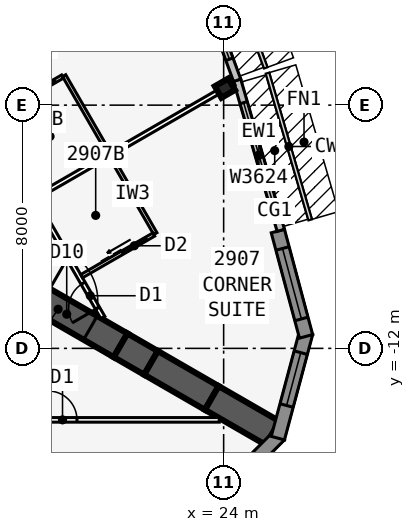
"""IFC4 building model, lengths in metres.
Left out: names, types, materials, properties, quantities, classifications, styles, units other than length and angle.
Written with IfcOpenShell. Run it as: python <this file> out.ifc"""

import sys

from ifc_helpers import new_model, si_unit, direction, frame, frame_2d, origin, origin_2d, place, context, subcontext, project, spatial, polyline, rectangle, i_section, outline, extrude, element, fill, save


model = new_model("IFC4")
c1 = context("Model", 3, precision=1e-05, world=origin(), true_north=direction((0.0, 1.0)))
c2 = subcontext(c1, "Body", "Model", "MODEL_VIEW")
j1 = project(units=[si_unit("LENGTHUNIT", "METRE"), si_unit("PLANEANGLEUNIT", "RADIAN")], contexts=[c1])
p1 = place(None, origin())
s1 = spatial("IfcSite", under=j1, at=p1, CompositionType="ELEMENT")
p2 = place(p1, origin())
s2 = spatial("IfcBuilding", under=s1, at=p2, CompositionType="ELEMENT")
p3 = place(p2, frame((0.0, 0.0, 114.7)))
s3 = spatial("IfcBuildingStorey", under=s2, at=p3, CompositionType="ELEMENT", Elevation=114.7)
p4 = place(p3, frame((16.5, -9.526, 0.0), z_axis=(0.0, 0.0, 1.0), x_axis=(0.866031398331, -0.499989616998, 0.0)))
e1 = element("IfcWall", 1, at=p4, inside=s3, PredefinedType="SHEAR", context=c2, shape_type="SweptSolid", body=[
    extrude(rectangle(XDim=4.746, YDim=0.9, at=frame_2d((2.373, 0.0))), origin(), (0.0, 0.0, 1.0), 3.4),
])
p5 = place(p4, frame((1.8, 0.0, 0.0)))
e2 = element("IfcOpeningElement", 2, at=p5, cuts=e1, PredefinedType="OPENING", context=c2, shape_type="SweptSolid", body=[
    extrude(rectangle(XDim=1.8, YDim=2.13, at=frame_2d((0.9, 1.065))), frame((0.0, 0.46, 0.0), z_axis=(0.0, -1.0, 0.0), x_axis=(1.0, 0.0, 0.0)), (0.0, 0.0, 1.0), 0.92),
])
p6 = place(p3, frame((20.61, -11.899, 0.0), z_axis=(0.0, 0.0, 1.0), x_axis=(0.866009537788, -0.500027479704, 0.0)))
e3 = element("IfcWall", 3, at=p6, inside=s3, PredefinedType="SHEAR", context=c2, shape_type="SweptSolid", body=[
    extrude(rectangle(XDim=1.155, YDim=0.9, at=frame_2d((0.577, 0.0))), origin(), (0.0, 0.0, 1.0), 3.4),
])
for number, where, z_axis, x_axis in (
    (4, (21.61, -12.477, 0.0), (0.0, 0.0, 1.0), (0.866, -0.5, 0.0)),
    (5, (23.61, -13.631, 0.0), (0.0, 0.0, 1.0), (0.866, -0.5, 0.0)),
):
    element("IfcWall", number, at=place(p3, frame(where, z_axis=z_axis, x_axis=x_axis)), inside=s3, PredefinedType="SHEAR", context=c2, shape_type="SweptSolid", body=[
        extrude(rectangle(XDim=2.309, YDim=0.9, at=frame_2d((1.155, 0.0))), origin(), (0.0, 0.0, 1.0), 3.4),
    ])
p7 = place(p3, frame((24.041, -3.44, 0.0), z_axis=(0.0, 0.0, 1.0), x_axis=(-0.5, 0.866025403784, 0.0)))
e6 = element("IfcColumn", 6, at=p7, inside=s3, PredefinedType="COLUMN", context=c2, shape_type="SweptSolid", body=[
    extrude(i_section(OverallWidth=0.437, OverallDepth=0.513, WebThickness=0.061, FlangeThickness=0.097, at=origin_2d()), origin(), (0.0, 0.0, 1.0), 3.4),
])
p8 = place(p3, frame((23.305, -17.388, 0.0), z_axis=(0.0, 0.0, 1.0), x_axis=(0.707106781187, 0.707106781187, 0.0)))
e7 = element("IfcWall", 7, at=p8, inside=s3, PredefinedType="SOLIDWALL", context=c2, shape_type="SweptSolid", body=[
    extrude(outline(polyline([(3.586, 0.225), (3.527, 0.225), (3.035, 0.093), (3.0, 0.225), (0.0, 0.225), (0.0, -0.225), (3.586, -0.225), (3.586, 0.225)])), origin(), (0.0, 0.0, 1.0), 3.235),
])
p9 = place(p8, frame((0.675, 0.0, 0.45)))
e8 = element("IfcOpeningElement", 8, at=p9, cuts=e7, PredefinedType="OPENING", context=c2, shape_type="SweptSolid", body=[
    extrude(rectangle(XDim=1.8, YDim=2.4, at=frame_2d((0.9, 1.2))), frame((0.0, 0.235, 0.0), z_axis=(0.0, -1.0, 0.0), x_axis=(1.0, 0.0, 0.0)), (0.0, 0.0, 1.0), 0.47),
])
p10 = place(p3, frame((25.783, -14.953, 0.0), z_axis=(0.0, 0.0, 1.0), x_axis=(0.258823421857, 0.965924653531, 0.0)))
e9 = element("IfcWall", 9, at=p10, inside=s3, PredefinedType="SOLIDWALL", context=c2, shape_type="SweptSolid", body=[
    extrude(outline(polyline([(3.586, 0.225), (0.586, 0.225), (0.551, 0.093), (0.06, 0.225), (0.0, 0.225), (0.0, -0.225), (3.586, -0.225), (3.586, 0.225)])), origin(), (0.0, 0.0, 1.0), 3.235),
])
p11 = place(p10, frame((1.111, 0.0, 0.45)))
e10 = element("IfcOpeningElement", 10, at=p11, cuts=e9, PredefinedType="OPENING", context=c2, shape_type="SweptSolid", body=[
    extrude(rectangle(XDim=1.8, YDim=2.4, at=frame_2d((0.9, 1.2))), frame((0.0, 0.235, 0.0), z_axis=(0.0, -1.0, 0.0), x_axis=(1.0, 0.0, 0.0)), (0.0, 0.0, 1.0), 0.47),
])
p12 = place(p3, frame((26.711, -11.605, 0.0), z_axis=(0.0, 0.0, 1.0), x_axis=(-0.258823421857, 0.965924653531, 0.0)))
e11 = element("IfcWall", 11, at=p12, inside=s3, PredefinedType="SOLIDWALL", context=c2, shape_type="SweptSolid", body=[
    extrude(rectangle(XDim=3.586, YDim=0.45, at=frame_2d((1.793, 0.0))), origin(), (0.0, 0.0, 1.0), 3.235),
])
p13 = place(p12, frame((0.593, 0.0, 0.45)))
e12 = element("IfcOpeningElement", 12, at=p13, cuts=e11, PredefinedType="OPENING", context=c2, shape_type="SweptSolid", body=[
    extrude(rectangle(XDim=2.4, YDim=2.4, at=frame_2d((1.2, 1.2))), frame((0.0, 0.235, 0.0), z_axis=(0.0, -1.0, 0.0), x_axis=(1.0, 0.0, 0.0)), (0.0, 0.0, 1.0), 0.47),
])
p14 = place(p3, frame((25.88, -8.118, 0.0), z_axis=(0.0, 0.0, 1.0), x_axis=(-0.279528287117, 0.960137457191, 0.0)))
e13 = element("IfcWall", 13, at=p14, inside=s3, PredefinedType="STANDARD", context=c2, shape_type="SweptSolid", body=[
    extrude(rectangle(XDim=5.148, YDim=0.25, at=frame_2d((2.574, 0.0))), origin(), (0.0, 0.0, 1.0), 3.235),
])
p15 = place(p14, frame((0.774, 0.0, 0.45)))
e14 = element("IfcOpeningElement", 14, at=p15, cuts=e13, PredefinedType="OPENING", context=c2, shape_type="SweptSolid", body=[
    extrude(rectangle(XDim=3.6, YDim=2.4, at=frame_2d((1.8, 1.2))), frame((0.0, 0.135, 0.0), z_axis=(0.0, -1.0, 0.0), x_axis=(1.0, 0.0, 0.0)), (0.0, 0.0, 1.0), 0.27),
])
p16 = place(p3, frame((24.444, -3.183, 0.0), z_axis=(0.0, 0.0, 1.0), x_axis=(-0.343225593282, 0.939252996863, 0.0)))
e15 = element("IfcWall", 15, at=p16, inside=s3, PredefinedType="STANDARD", context=c2, shape_type="SweptSolid", body=[
    extrude(rectangle(XDim=5.076, YDim=0.25, at=frame_2d((2.538, 0.0))), origin(), (0.0, 0.0, 1.0), 3.235),
])
p17 = place(p16, frame((0.738, 0.0, 0.45)))
e16 = element("IfcOpeningElement", 16, at=p17, cuts=e15, PredefinedType="OPENING", context=c2, shape_type="SweptSolid", body=[
    extrude(rectangle(XDim=3.6, YDim=2.4, at=frame_2d((1.8, 1.2))), frame((0.0, 0.135, 0.0), z_axis=(0.0, -1.0, 0.0), x_axis=(1.0, 0.0, 0.0)), (0.0, 0.0, 1.0), 0.27),
])
p18 = place(p3, frame((-23.857, -14.351, 0.0), z_axis=(0.0, 0.0, 1.0), x_axis=(1.0, 0.0, 0.0)))
e17 = element("IfcWall", 17, at=p18, inside=s3, PredefinedType="PARTITIONING", context=c2, shape_type="SweptSolid", body=[
    extrude(rectangle(XDim=47.714, YDim=0.15, at=frame_2d((23.857, 0.0))), origin(), (0.0, 0.0, 1.0), 3.235),
])
p19 = place(p18, frame((4.682, 0.0, 0.0)))
e18 = element("IfcOpeningElement", 18, at=p19, cuts=e17, PredefinedType="OPENING", context=c2, shape_type="SweptSolid", body=[
    extrude(rectangle(XDim=0.95, YDim=2.13, at=frame_2d((0.475, 1.065))), frame((0.0, 0.085, 0.0), z_axis=(0.0, -1.0, 0.0), x_axis=(1.0, 0.0, 0.0)), (0.0, 0.0, 1.0), 0.17),
])
p20 = place(p18, frame((11.482, 0.0, 0.0)))
e19 = element("IfcOpeningElement", 19, at=p20, cuts=e17, PredefinedType="OPENING", context=c2, shape_type="SweptSolid", body=[
    extrude(rectangle(XDim=0.95, YDim=2.13, at=frame_2d((0.475, 1.065))), frame((0.0, 0.085, 0.0), z_axis=(0.0, -1.0, 0.0), x_axis=(1.0, 0.0, 0.0)), (0.0, 0.0, 1.0), 0.17),
])
p21 = place(p18, frame((16.482, 0.0, 0.0)))
e20 = element("IfcOpeningElement", 20, at=p21, cuts=e17, PredefinedType="OPENING", context=c2, shape_type="SweptSolid", body=[
    extrude(rectangle(XDim=0.95, YDim=2.13, at=frame_2d((0.475, 1.065))), frame((0.0, 0.085, 0.0), z_axis=(0.0, -1.0, 0.0), x_axis=(1.0, 0.0, 0.0)), (0.0, 0.0, 1.0), 0.17),
])
p22 = place(p18, frame((21.482, 0.0, 0.0)))
e21 = element("IfcOpeningElement", 21, at=p22, cuts=e17, PredefinedType="OPENING", context=c2, shape_type="SweptSolid", body=[
    extrude(rectangle(XDim=0.95, YDim=2.13, at=frame_2d((0.475, 1.065))), frame((0.0, 0.085, 0.0), z_axis=(0.0, -1.0, 0.0), x_axis=(1.0, 0.0, 0.0)), (0.0, 0.0, 1.0), 0.17),
])
p23 = place(p18, frame((25.857, 0.0, 0.0)))
e22 = element("IfcOpeningElement", 22, at=p23, cuts=e17, PredefinedType="OPENING", context=c2, shape_type="SweptSolid", body=[
    extrude(rectangle(XDim=1.0, YDim=2.13, at=frame_2d((0.5, 1.065))), frame((0.0, 0.085, 0.0), z_axis=(0.0, -1.0, 0.0), x_axis=(1.0, 0.0, 0.0)), (0.0, 0.0, 1.0), 0.17),
])
p24 = place(p18, frame((32.082, 0.0, 0.0)))
e23 = element("IfcOpeningElement", 23, at=p24, cuts=e17, PredefinedType="OPENING", context=c2, shape_type="SweptSolid", body=[
    extrude(rectangle(XDim=0.95, YDim=2.13, at=frame_2d((0.475, 1.065))), frame((0.0, 0.085, 0.0), z_axis=(0.0, -1.0, 0.0), x_axis=(1.0, 0.0, 0.0)), (0.0, 0.0, 1.0), 0.17),
])
p25 = place(p18, frame((42.082, 0.0, 0.0)))
e24 = element("IfcOpeningElement", 24, at=p25, cuts=e17, PredefinedType="OPENING", context=c2, shape_type="SweptSolid", body=[
    extrude(rectangle(XDim=0.95, YDim=2.13, at=frame_2d((0.475, 1.065))), frame((0.0, 0.085, 0.0), z_axis=(0.0, -1.0, 0.0), x_axis=(1.0, 0.0, 0.0)), (0.0, 0.0, 1.0), 0.17),
])
p26 = place(p3, frame((20.027, -10.985, 0.0), z_axis=(0.0, 0.0, 1.0), x_axis=(-0.500001677587, 0.866024435227, 0.0)))
e25 = element("IfcWall", 25, at=p26, inside=s3, PredefinedType="PARTITIONING", context=c2, shape_type="SweptSolid", body=[
    extrude(rectangle(XDim=39.054, YDim=0.15, at=frame_2d((19.527, 0.0))), origin(), (0.0, 0.0, 1.0), 3.235),
])
p27 = place(p26, frame((0.352, 0.0, 0.0)))
e26 = element("IfcOpeningElement", 26, at=p27, cuts=e25, PredefinedType="OPENING", context=c2, shape_type="SweptSolid", body=[
    extrude(rectangle(XDim=0.95, YDim=2.13, at=frame_2d((0.475, 1.065))), frame((0.0, 0.085, 0.0), z_axis=(0.0, -1.0, 0.0), x_axis=(1.0, 0.0, 0.0)), (0.0, 0.0, 1.0), 0.17),
])
p28 = place(p26, frame((7.752, 0.0, 0.0)))
e27 = element("IfcOpeningElement", 27, at=p28, cuts=e25, PredefinedType="OPENING", context=c2, shape_type="SweptSolid", body=[
    extrude(rectangle(XDim=0.95, YDim=2.13, at=frame_2d((0.475, 1.065))), frame((0.0, 0.085, 0.0), z_axis=(0.0, -1.0, 0.0), x_axis=(1.0, 0.0, 0.0)), (0.0, 0.0, 1.0), 0.17),
])
p29 = place(p26, frame((17.752, 0.0, 0.0)))
e28 = element("IfcOpeningElement", 28, at=p29, cuts=e25, PredefinedType="OPENING", context=c2, shape_type="SweptSolid", body=[
    extrude(rectangle(XDim=0.95, YDim=2.13, at=frame_2d((0.475, 1.065))), frame((0.0, 0.085, 0.0), z_axis=(0.0, -1.0, 0.0), x_axis=(1.0, 0.0, 0.0)), (0.0, 0.0, 1.0), 0.17),
])
p30 = place(p26, frame((22.152, 0.0, 0.0)))
e29 = element("IfcOpeningElement", 29, at=p30, cuts=e25, PredefinedType="OPENING", context=c2, shape_type="SweptSolid", body=[
    extrude(rectangle(XDim=0.95, YDim=2.13, at=frame_2d((0.475, 1.065))), frame((0.0, 0.085, 0.0), z_axis=(0.0, -1.0, 0.0), x_axis=(1.0, 0.0, 0.0)), (0.0, 0.0, 1.0), 0.17),
])
p31 = place(p26, frame((27.152, 0.0, 0.0)))
e30 = element("IfcOpeningElement", 30, at=p31, cuts=e25, PredefinedType="OPENING", context=c2, shape_type="SweptSolid", body=[
    extrude(rectangle(XDim=0.95, YDim=2.13, at=frame_2d((0.475, 1.065))), frame((0.0, 0.085, 0.0), z_axis=(0.0, -1.0, 0.0), x_axis=(1.0, 0.0, 0.0)), (0.0, 0.0, 1.0), 0.17),
])
p32 = place(p26, frame((36.546, 0.0, 0.0)))
e31 = element("IfcOpeningElement", 31, at=p32, cuts=e25, PredefinedType="OPENING", context=c2, shape_type="SweptSolid", body=[
    extrude(rectangle(XDim=0.95, YDim=2.13, at=frame_2d((0.475, 1.065))), frame((0.0, 0.085, 0.0), z_axis=(0.0, -1.0, 0.0), x_axis=(1.0, 0.0, 0.0)), (0.0, 0.0, 1.0), 0.17),
])
p33 = place(p3, frame((17.829, -7.027, 0.0), z_axis=(0.0, 0.0, 1.0), x_axis=(0.866029804378, 0.499992377871, 0.0)))
e32 = element("IfcWall", 32, at=p33, inside=s3, PredefinedType="PARTITIONING", context=c2, shape_type="SweptSolid", body=[
    extrude(rectangle(XDim=7.516, YDim=0.15, at=frame_2d((3.758, 0.0))), origin(), (0.0, 0.0, 1.0), 2.389),
])
p34 = place(p3, frame((21.753, -8.225, 0.0), z_axis=(0.0, 0.0, 1.0), x_axis=(-0.499990139034, 0.866031096941, 0.0)))
e33 = element("IfcWall", 33, at=p34, inside=s3, PredefinedType="PLUMBINGWALL", context=c2, shape_type="SweptSolid", body=[
    extrude(rectangle(XDim=3.0, YDim=0.12, at=frame_2d((1.5, 0.0))), origin(), (0.0, 0.0, 1.0), 3.235),
])
p35 = place(p3, frame((19.329, -9.625, 0.0), z_axis=(0.0, 0.0, 1.0), x_axis=(0.866035715982, 0.499982138324, 0.0)))
e34 = element("IfcWall", 34, at=p35, inside=s3, PredefinedType="PLUMBINGWALL", context=c2, shape_type="SweptSolid", body=[
    extrude(rectangle(XDim=2.74, YDim=0.12, at=frame_2d((1.37, 0.0))), origin(), (0.0, 0.0, 1.0), 3.235),
])
p36 = place(p35, frame((1.55, 0.0, 0.0)))
e35 = element("IfcOpeningElement", 35, at=p36, cuts=e34, PredefinedType="OPENING", context=c2, shape_type="SweptSolid", body=[
    extrude(rectangle(XDim=0.9, YDim=2.13, at=frame_2d((0.45, 1.065))), frame((0.0, 0.07, 0.0), z_axis=(0.0, -1.0, 0.0), x_axis=(1.0, 0.0, 0.0)), (0.0, 0.0, 1.0), 0.14),
])
p37 = place(p3, frame((20.253, -5.627, 0.0), z_axis=(0.0, 0.0, 1.0), x_axis=(-0.50002537861, 0.866010750942, 0.0)))
e36 = element("IfcWall", 36, at=p37, inside=s3, PredefinedType="PLUMBINGWALL", context=c2, shape_type="SweptSolid", body=[
    extrude(rectangle(XDim=3.0, YDim=0.12, at=frame_2d((1.5, 0.0))), origin(), (0.0, 0.0, 1.0), 3.235),
])
p38 = place(p3, frame((16.329, -4.429, 0.0), z_axis=(0.0, 0.0, 1.0), x_axis=(0.865997131366, 0.500048966069, 0.0)))
e37 = element("IfcWall", 37, at=p38, inside=s3, PredefinedType="PLUMBINGWALL", context=c2, shape_type="SweptSolid", body=[
    extrude(rectangle(XDim=2.74, YDim=0.12, at=frame_2d((1.37, 0.0))), origin(), (0.0, 0.0, 1.0), 3.235),
])
p39 = place(p38, frame((1.55, 0.0, 0.0)))
e38 = element("IfcOpeningElement", 38, at=p39, cuts=e37, PredefinedType="OPENING", context=c2, shape_type="SweptSolid", body=[
    extrude(rectangle(XDim=0.9, YDim=2.13, at=frame_2d((0.45, 1.065))), frame((0.0, 0.07, 0.0), z_axis=(0.0, -1.0, 0.0), x_axis=(1.0, 0.0, 0.0)), (0.0, 0.0, 1.0), 0.14),
])
p40 = place(p11, origin())
e39 = element("IfcWindow", 39, at=p40, inside=s3, PartitioningType="SINGLE_PANEL", PredefinedType="WINDOW", context=c2, shape_type="SweptSolid", body=[
    extrude(rectangle(XDim=1.8, YDim=2.4, at=frame_2d((0.9, 1.2))), frame((0.0, 0.03, 0.0), z_axis=(0.0, -1.0, 0.0), x_axis=(1.0, 0.0, 0.0)), (0.0, 0.0, 1.0), 0.06),
])
fill(e10, e39)
p41 = place(p13, origin())
e40 = element("IfcWindow", 40, at=p41, inside=s3, PartitioningType="SINGLE_PANEL", PredefinedType="WINDOW", context=c2, shape_type="SweptSolid", body=[
    extrude(rectangle(XDim=2.4, YDim=2.4, at=frame_2d((1.2, 1.2))), frame((0.0, 0.03, 0.0), z_axis=(0.0, -1.0, 0.0), x_axis=(1.0, 0.0, 0.0)), (0.0, 0.0, 1.0), 0.06),
])
fill(e12, e40)
p42 = place(p15, origin())
e41 = element("IfcWindow", 41, at=p42, inside=s3, PartitioningType="SINGLE_PANEL", PredefinedType="WINDOW", context=c2, shape_type="SweptSolid", body=[
    extrude(rectangle(XDim=3.6, YDim=2.4, at=frame_2d((1.8, 1.2))), frame((0.0, 0.03, 0.0), z_axis=(0.0, -1.0, 0.0), x_axis=(1.0, 0.0, 0.0)), (0.0, 0.0, 1.0), 0.06),
])
fill(e14, e41)
p43 = place(p17, origin())
e42 = element("IfcWindow", 42, at=p43, inside=s3, PartitioningType="SINGLE_PANEL", PredefinedType="WINDOW", context=c2, shape_type="SweptSolid", body=[
    extrude(rectangle(XDim=3.6, YDim=2.4, at=frame_2d((1.8, 1.2))), frame((0.0, 0.03, 0.0), z_axis=(0.0, -1.0, 0.0), x_axis=(1.0, 0.0, 0.0)), (0.0, 0.0, 1.0), 0.06),
])
fill(e16, e42)
p44 = place(p25, origin())
e43 = element("IfcDoor", 43, at=p44, inside=s3, OperationType="SINGLE_SWING_LEFT", PredefinedType="DOOR", context=c2, shape_type="SweptSolid", body=[
    extrude(rectangle(XDim=0.95, YDim=2.13, at=frame_2d((0.475, 1.065))), frame((0.0, 0.025, 0.0), z_axis=(0.0, -1.0, 0.0), x_axis=(1.0, 0.0, 0.0)), (0.0, 0.0, 1.0), 0.05),
])
fill(e24, e43)
p45 = place(p36, origin())
e44 = element("IfcDoor", 44, at=p45, inside=s3, OperationType="SLIDING_TO_LEFT", PredefinedType="DOOR", context=c2, shape_type="SweptSolid", body=[
    extrude(rectangle(XDim=0.9, YDim=2.13, at=frame_2d((0.45, 1.065))), frame((0.0, 0.025, 0.0), z_axis=(0.0, -1.0, 0.0), x_axis=(1.0, 0.0, 0.0)), (0.0, 0.0, 1.0), 0.05),
])
fill(e35, e44)
p46 = place(p27, origin())
e45 = element("IfcDoor", 45, at=p46, inside=s3, OperationType="SINGLE_SWING_LEFT", PredefinedType="DOOR", context=c2, shape_type="SweptSolid", body=[
    extrude(rectangle(XDim=0.95, YDim=2.13, at=frame_2d((0.475, 1.065))), frame((0.0, 0.025, 0.0), z_axis=(0.0, -1.0, 0.0), x_axis=(1.0, 0.0, 0.0)), (0.0, 0.0, 1.0), 0.05),
])
fill(e26, e45)
p47 = place(p39, origin())
e46 = element("IfcDoor", 46, at=p47, inside=s3, OperationType="SLIDING_TO_LEFT", PredefinedType="DOOR", context=c2, shape_type="SweptSolid", body=[
    extrude(rectangle(XDim=0.9, YDim=2.13, at=frame_2d((0.45, 1.065))), frame((0.0, 0.025, 0.0), z_axis=(0.0, -1.0, 0.0), x_axis=(1.0, 0.0, 0.0)), (0.0, 0.0, 1.0), 0.05),
])
fill(e38, e46)
p48 = place(p5, origin())
e47 = element("IfcDoor", 47, at=p48, inside=s3, OperationType="DOUBLE_DOOR_DOUBLE_SWING", PredefinedType="DOOR", context=c2, shape_type="SweptSolid", body=[
    extrude(rectangle(XDim=1.8, YDim=2.13, at=frame_2d((0.9, 1.065))), frame((0.0, 0.025, 0.0), z_axis=(0.0, -1.0, 0.0), x_axis=(1.0, 0.0, 0.0)), (0.0, 0.0, 1.0), 0.05),
])
fill(e2, e47)
save(model, sys.argv[1])
